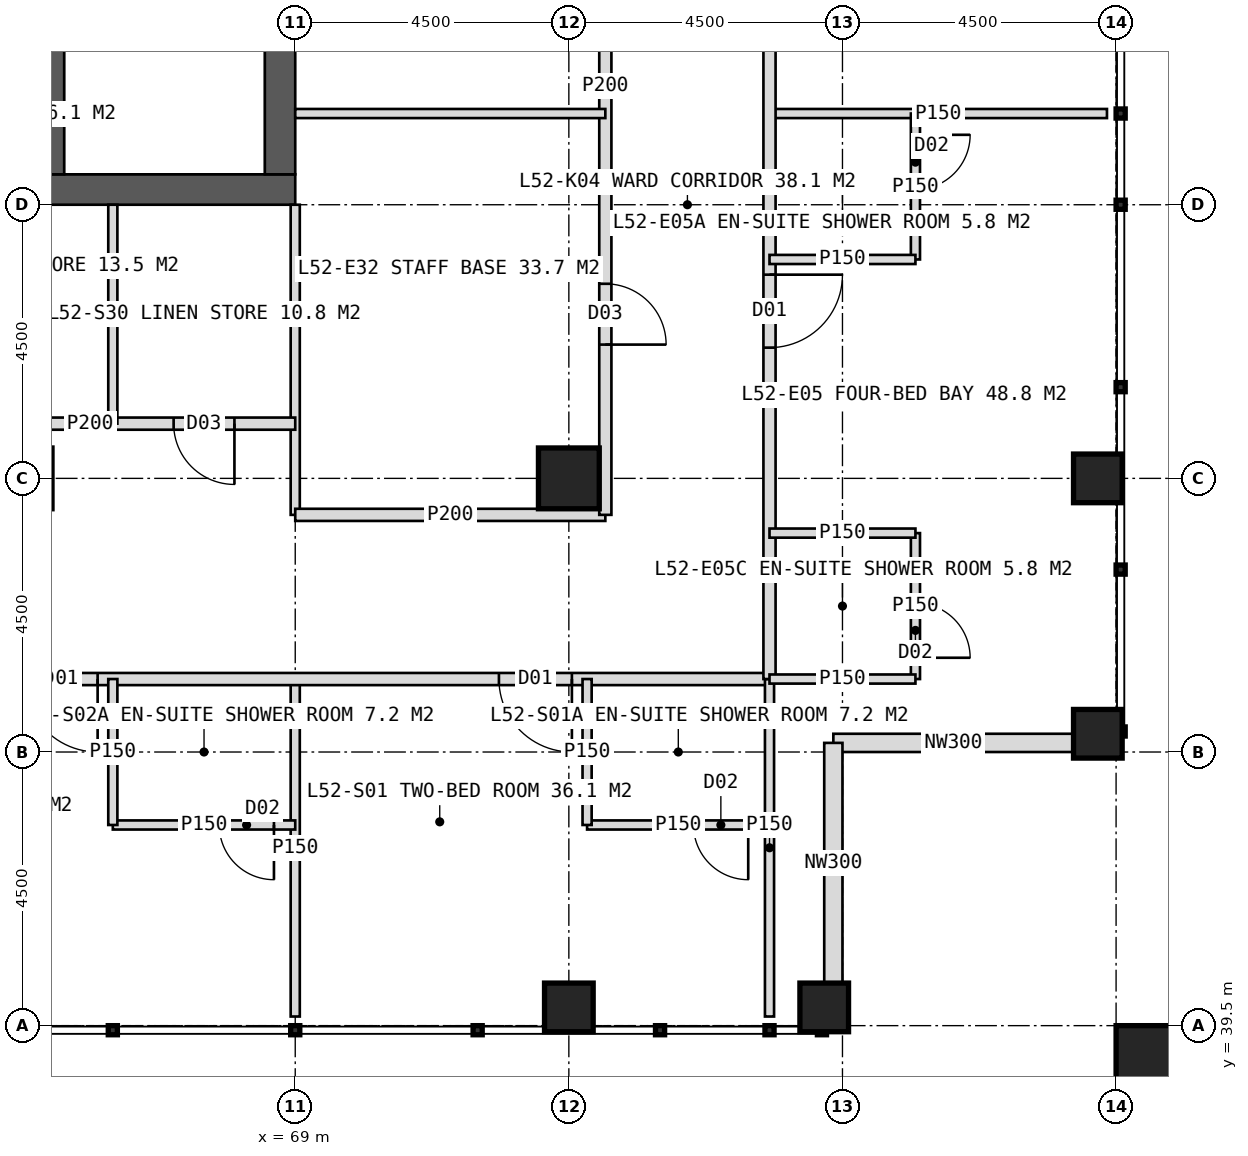
"""IFC4 building model, lengths in metres.
Left out: names, types, materials, properties, quantities, classifications, styles, units other than length and angle.
Written with IfcOpenShell. Run it as: python <this file> out.ifc"""

import sys

from ifc_helpers import new_model, si_unit, direction, frame, frame_2d, origin, origin_2d, place, context, subcontext, project, spatial, rectangle, hollow_rectangle, extrude, element, fill, save


model = new_model("IFC4")
c1 = context("Model", 3, precision=1e-05, world=origin(), true_north=direction((0.0, 1.0)))
c2 = subcontext(c1, "Body", "Model", "MODEL_VIEW")
j1 = project(units=[si_unit("LENGTHUNIT", "METRE"), si_unit("PLANEANGLEUNIT", "RADIAN")], contexts=[c1])
p1 = place(None, origin())
s1 = spatial("IfcSite", under=j1, at=p1, CompositionType="ELEMENT")
p2 = place(p1, origin())
s2 = spatial("IfcBuilding", under=s1, at=p2, CompositionType="ELEMENT")
p3 = place(p2, frame((0.0, 0.0, 217.0)))
s3 = spatial("IfcBuildingStorey", under=s2, at=p3, CompositionType="ELEMENT", Elevation=217.0)
p4 = place(p3, frame((51.0, 53.25, 0.0), z_axis=(0.0, 0.0, 1.0), x_axis=(1.0, 0.0, 0.0)))
e1 = element("IfcWall", 1, at=p4, inside=s3, PredefinedType="SHEAR", context=c2, shape_type="SweptSolid", body=[
    extrude(rectangle(XDim=18.0, YDim=0.5, at=frame_2d((9.0, 0.0))), origin(), (0.0, 0.0, 1.0), 4.0),
])
p5 = place(p4, frame((8.1, 0.0, 0.0)))
e2 = element("IfcOpeningElement", 2, at=p5, cuts=e1, PredefinedType="OPENING", context=c2, shape_type="SweptSolid", body=[
    extrude(rectangle(XDim=1.8, YDim=2.2, at=frame_2d((0.9, 1.1))), frame((0.0, 0.26, 0.0), z_axis=(0.0, -1.0, 0.0), x_axis=(1.0, 0.0, 0.0)), (0.0, 0.0, 1.0), 0.52),
])
p6 = place(p3, frame((68.75, 53.5, 0.0), z_axis=(0.0, 0.0, 1.0), x_axis=(0.0, 1.0, 0.0)))
e3 = element("IfcWall", 3, at=p6, inside=s3, PredefinedType="SHEAR", context=c2, shape_type="SweptSolid", body=[
    extrude(rectangle(XDim=17.0, YDim=0.5, at=frame_2d((8.5, 0.0))), origin(), (0.0, 0.0, 1.0), 4.0),
])
p7 = place(p6, frame((9.6, 0.0, 0.0)))
e4 = element("IfcOpeningElement", 4, at=p7, cuts=e3, PredefinedType="OPENING", context=c2, shape_type="SweptSolid", body=[
    extrude(rectangle(XDim=1.5, YDim=2.2, at=frame_2d((0.75, 1.1))), frame((0.0, 0.26, 0.0), z_axis=(0.0, -1.0, 0.0), x_axis=(1.0, 0.0, 0.0)), (0.0, 0.0, 1.0), 0.52),
])
p8 = place(p3, frame((65.05, 53.5, 0.0), z_axis=(0.0, 0.0, 1.0), x_axis=(0.0, 1.0, 0.0)))
e5 = element("IfcWall", 5, at=p8, inside=s3, PredefinedType="SHEAR", context=c2, shape_type="SweptSolid", body=[
    extrude(rectangle(XDim=17.0, YDim=0.3, at=frame_2d((8.5, 0.0))), origin(), (0.0, 0.0, 1.0), 4.0),
])
p9 = place(p3, frame((73.5, 48.5, 0.0), z_axis=(0.0, 0.0, 1.0), x_axis=(1.0, 0.0, 0.0)))
e6 = element("IfcColumn", 6, at=p9, inside=s3, PredefinedType="COLUMN", context=c2, shape_type="SweptSolid", body=[
    extrude(hollow_rectangle(XDim=1.0, YDim=1.0, WallThickness=0.1, at=origin_2d()), origin(), (0.0, 0.0, 1.0), 4.0),
])
for number, where, z_axis, x_axis in (
    (7, (82.2, 44.3, 0.0), (0.0, 0.0, 1.0), (1.0, 0.0, 0.0)),
    (8, (82.2, 48.5, 0.0), (0.0, 0.0, 1.0), (1.0, 0.0, 0.0)),
    (9, (73.5, 39.8, 0.0), (0.0, 0.0, 1.0), (1.0, 0.0, 0.0)),
    (10, (77.7, 39.8, 0.0), (0.0, 0.0, 1.0), (1.0, 0.0, 0.0)),
):
    element("IfcColumn", number, at=place(p3, frame(where, z_axis=z_axis, x_axis=x_axis)), inside=s3, PredefinedType="COLUMN", context=c2, shape_type="SweptSolid", body=[
        extrude(hollow_rectangle(XDim=0.8, YDim=0.8, WallThickness=0.08, at=origin_2d()), origin(), (0.0, 0.0, 1.0), 4.0),
    ])
p10 = place(p3, frame((83.1, 38.9, 0.0), z_axis=(0.0, 0.0, 1.0), x_axis=(1.0, 0.0, 0.0)))
e11 = element("IfcColumn", 11, at=p10, inside=s3, PredefinedType="COLUMN", context=c2, shape_type="SweptSolid", body=[
    extrude(hollow_rectangle(XDim=1.2, YDim=1.2, WallThickness=0.07, at=origin_2d()), origin(), (0.0, 0.0, 1.0), 4.0),
])
for number, where, z_axis, x_axis in (
    (12, (81.8, 44.15, 0.0), (0.0, 0.0, 1.0), (-1.0, 0.0, 0.0)),
    (13, (77.85, 44.15, 0.0), (0.0, 0.0, 1.0), (0.0, -1.0, 0.0)),
):
    element("IfcWall", number, at=place(p3, frame(where, z_axis=z_axis, x_axis=x_axis)), inside=s3, PredefinedType="ELEMENTEDWALL", context=c2, shape_type="SweptSolid", body=[
        extrude(rectangle(XDim=3.95, YDim=0.3, at=frame_2d((1.975, 0.0))), origin(), (0.0, 0.0, 1.0), 2.85),
    ])
p11 = place(p3, frame((69.0, 45.2, 0.0), z_axis=(0.0, 0.0, 1.0), x_axis=(0.0, -1.0, 0.0)))
e14 = element("IfcWall", 14, at=p11, inside=s3, PredefinedType="PARTITIONING", context=c2, shape_type="SweptSolid", body=[
    extrude(rectangle(XDim=5.55, YDim=0.15, at=frame_2d((2.775, 0.0))), origin(), (0.0, 0.0, 1.0), 3.75),
])
p12 = place(p3, frame((76.8, 45.2, 0.0), z_axis=(0.0, 0.0, 1.0), x_axis=(-1.0, 0.0, 0.0)))
e15 = element("IfcWall", 15, at=p12, inside=s3, PredefinedType="PARTITIONING", context=c2, shape_type="SweptSolid", body=[
    extrude(rectangle(XDim=33.6, YDim=0.2, at=frame_2d((16.8, 0.0))), origin(), (0.0, 0.0, 1.0), 3.75),
])
p13 = place(p12, frame((3.25, 0.0, 0.0)))
e16 = element("IfcOpeningElement", 16, at=p13, cuts=e15, PredefinedType="OPENING", context=c2, shape_type="SweptSolid", body=[
    extrude(rectangle(XDim=1.2, YDim=2.2, at=frame_2d((0.6, 1.1))), frame((0.0, 0.11, 0.0), z_axis=(0.0, -1.0, 0.0), x_axis=(1.0, 0.0, 0.0)), (0.0, 0.0, 1.0), 0.22),
])
p14 = place(p12, frame((11.05, 0.0, 0.0)))
e17 = element("IfcOpeningElement", 17, at=p14, cuts=e15, PredefinedType="OPENING", context=c2, shape_type="SweptSolid", body=[
    extrude(rectangle(XDim=1.2, YDim=2.2, at=frame_2d((0.6, 1.1))), frame((0.0, 0.11, 0.0), z_axis=(0.0, -1.0, 0.0), x_axis=(1.0, 0.0, 0.0)), (0.0, 0.0, 1.0), 0.22),
])
p15 = place(p12, frame((20.05, 0.0, 0.0)))
e18 = element("IfcOpeningElement", 18, at=p15, cuts=e15, PredefinedType="OPENING", context=c2, shape_type="SweptSolid", body=[
    extrude(rectangle(XDim=1.2, YDim=2.2, at=frame_2d((0.6, 1.1))), frame((0.0, 0.11, 0.0), z_axis=(0.0, -1.0, 0.0), x_axis=(1.0, 0.0, 0.0)), (0.0, 0.0, 1.0), 0.22),
])
p16 = place(p12, frame((29.05, 0.0, 0.0)))
e19 = element("IfcOpeningElement", 19, at=p16, cuts=e15, PredefinedType="OPENING", context=c2, shape_type="SweptSolid", body=[
    extrude(rectangle(XDim=1.2, YDim=2.2, at=frame_2d((0.6, 1.1))), frame((0.0, 0.11, 0.0), z_axis=(0.0, -1.0, 0.0), x_axis=(1.0, 0.0, 0.0)), (0.0, 0.0, 1.0), 0.22),
])
p17 = place(p3, frame((76.8, 45.2, 0.0), z_axis=(0.0, 0.0, 1.0), x_axis=(0.0, -1.0, 0.0)))
e20 = element("IfcWall", 20, at=p17, inside=s3, PredefinedType="PARTITIONING", context=c2, shape_type="SweptSolid", body=[
    extrude(rectangle(XDim=5.55, YDim=0.15, at=frame_2d((2.775, 0.0))), origin(), (0.0, 0.0, 1.0), 3.75),
])
p18 = place(p3, frame((76.8, 42.8, 0.0), z_axis=(0.0, 0.0, 1.0), x_axis=(-1.0, 0.0, 0.0)))
e21 = element("IfcWall", 21, at=p18, inside=s3, PredefinedType="PARTITIONING", context=c2, shape_type="SweptSolid", body=[
    extrude(rectangle(XDim=3.0, YDim=0.15, at=frame_2d((1.5, 0.0))), origin(), (0.0, 0.0, 1.0), 3.75),
])
p19 = place(p18, frame((0.35, 0.0, 0.0)))
e22 = element("IfcOpeningElement", 22, at=p19, cuts=e21, PredefinedType="OPENING", context=c2, shape_type="SweptSolid", body=[
    extrude(rectangle(XDim=0.9, YDim=2.1, at=frame_2d((0.45, 1.05))), frame((0.0, 0.085, 0.0), z_axis=(0.0, -1.0, 0.0), x_axis=(1.0, 0.0, 0.0)), (0.0, 0.0, 1.0), 0.17),
])
p20 = place(p3, frame((73.8, 45.2, 0.0), z_axis=(0.0, 0.0, 1.0), x_axis=(0.0, -1.0, 0.0)))
e23 = element("IfcWall", 23, at=p20, inside=s3, PredefinedType="PARTITIONING", context=c2, shape_type="SweptSolid", body=[
    extrude(rectangle(XDim=2.4, YDim=0.15, at=frame_2d((1.2, 0.0))), origin(), (0.0, 0.0, 1.0), 3.75),
])
p21 = place(p3, frame((69.0, 42.8, 0.0), z_axis=(0.0, 0.0, 1.0), x_axis=(-1.0, 0.0, 0.0)))
e24 = element("IfcWall", 24, at=p21, inside=s3, PredefinedType="PARTITIONING", context=c2, shape_type="SweptSolid", body=[
    extrude(rectangle(XDim=3.0, YDim=0.15, at=frame_2d((1.5, 0.0))), origin(), (0.0, 0.0, 1.0), 3.75),
])
p22 = place(p21, frame((0.35, 0.0, 0.0)))
e25 = element("IfcOpeningElement", 25, at=p22, cuts=e24, PredefinedType="OPENING", context=c2, shape_type="SweptSolid", body=[
    extrude(rectangle(XDim=0.9, YDim=2.1, at=frame_2d((0.45, 1.05))), frame((0.0, 0.085, 0.0), z_axis=(0.0, -1.0, 0.0), x_axis=(1.0, 0.0, 0.0)), (0.0, 0.0, 1.0), 0.17),
])
p23 = place(p3, frame((66.0, 45.2, 0.0), z_axis=(0.0, 0.0, 1.0), x_axis=(0.0, -1.0, 0.0)))
e26 = element("IfcWall", 26, at=p23, inside=s3, PredefinedType="PARTITIONING", context=c2, shape_type="SweptSolid", body=[
    extrude(rectangle(XDim=2.4, YDim=0.15, at=frame_2d((1.2, 0.0))), origin(), (0.0, 0.0, 1.0), 3.75),
])
p24 = place(p3, frame((69.0, 53.0, 0.0), z_axis=(0.0, 0.0, 1.0), x_axis=(0.0, -1.0, 0.0)))
e27 = element("IfcWall", 27, at=p24, inside=s3, PredefinedType="PARTITIONING", context=c2, shape_type="SweptSolid", body=[
    extrude(rectangle(XDim=5.1, YDim=0.15, at=frame_2d((2.55, 0.0))), origin(), (0.0, 0.0, 1.0), 3.75),
])
p25 = place(p3, frame((74.1, 47.9, 0.0), z_axis=(0.0, 0.0, 1.0), x_axis=(-1.0, 0.0, 0.0)))
e28 = element("IfcWall", 28, at=p25, inside=s3, PredefinedType="PARTITIONING", context=c2, shape_type="SweptSolid", body=[
    extrude(rectangle(XDim=5.1, YDim=0.2, at=frame_2d((2.55, 0.0))), origin(), (0.0, 0.0, 1.0), 3.75),
])
p26 = place(p3, frame((69.0, 49.4, 0.0), z_axis=(0.0, 0.0, 1.0), x_axis=(-1.0, 0.0, 0.0)))
e29 = element("IfcWall", 29, at=p26, inside=s3, PredefinedType="PARTITIONING", context=c2, shape_type="SweptSolid", body=[
    extrude(rectangle(XDim=6.75, YDim=0.2, at=frame_2d((3.375, 0.0))), origin(), (0.0, 0.0, 1.0), 3.75),
])
p27 = place(p26, frame((1.0, 0.0, 0.0)))
e30 = element("IfcOpeningElement", 30, at=p27, cuts=e29, PredefinedType="OPENING", context=c2, shape_type="SweptSolid", body=[
    extrude(rectangle(XDim=1.0, YDim=2.1, at=frame_2d((0.5, 1.05))), frame((0.0, 0.11, 0.0), z_axis=(0.0, -1.0, 0.0), x_axis=(1.0, 0.0, 0.0)), (0.0, 0.0, 1.0), 0.22),
])
p28 = place(p26, frame((5.425, 0.0, 0.0)))
e31 = element("IfcOpeningElement", 31, at=p28, cuts=e29, PredefinedType="OPENING", context=c2, shape_type="SweptSolid", body=[
    extrude(rectangle(XDim=1.0, YDim=2.1, at=frame_2d((0.5, 1.05))), frame((0.0, 0.11, 0.0), z_axis=(0.0, -1.0, 0.0), x_axis=(1.0, 0.0, 0.0)), (0.0, 0.0, 1.0), 0.22),
])
p29 = place(p3, frame((66.0, 53.0, 0.0), z_axis=(0.0, 0.0, 1.0), x_axis=(0.0, -1.0, 0.0)))
e32 = element("IfcWall", 32, at=p29, inside=s3, PredefinedType="PARTITIONING", context=c2, shape_type="SweptSolid", body=[
    extrude(rectangle(XDim=3.6, YDim=0.15, at=frame_2d((1.8, 0.0))), origin(), (0.0, 0.0, 1.0), 3.75),
])
p30 = place(p3, frame((76.8, 54.5, 0.0), z_axis=(0.0, 0.0, 1.0), x_axis=(1.0, 0.0, 0.0)))
e33 = element("IfcWall", 33, at=p30, inside=s3, PredefinedType="PARTITIONING", context=c2, shape_type="SweptSolid", body=[
    extrude(rectangle(XDim=5.55, YDim=0.15, at=frame_2d((2.775, 0.0))), origin(), (0.0, 0.0, 1.0), 3.75),
])
p31 = place(p3, frame((76.8, 78.8, 0.0), z_axis=(0.0, 0.0, 1.0), x_axis=(0.0, -1.0, 0.0)))
e34 = element("IfcWall", 34, at=p31, inside=s3, PredefinedType="PARTITIONING", context=c2, shape_type="SweptSolid", body=[
    extrude(rectangle(XDim=33.6, YDim=0.2, at=frame_2d((16.8, 0.0))), origin(), (0.0, 0.0, 1.0), 3.75),
])
p32 = place(p31, frame((3.25, 0.0, 0.0)))
e35 = element("IfcOpeningElement", 35, at=p32, cuts=e34, PredefinedType="OPENING", context=c2, shape_type="SweptSolid", body=[
    extrude(rectangle(XDim=1.2, YDim=2.2, at=frame_2d((0.6, 1.1))), frame((0.0, 0.11, 0.0), z_axis=(0.0, -1.0, 0.0), x_axis=(1.0, 0.0, 0.0)), (0.0, 0.0, 1.0), 0.22),
])
p33 = place(p31, frame((10.45, 0.0, 0.0)))
e36 = element("IfcOpeningElement", 36, at=p33, cuts=e34, PredefinedType="OPENING", context=c2, shape_type="SweptSolid", body=[
    extrude(rectangle(XDim=1.2, YDim=2.2, at=frame_2d((0.6, 1.1))), frame((0.0, 0.11, 0.0), z_axis=(0.0, -1.0, 0.0), x_axis=(1.0, 0.0, 0.0)), (0.0, 0.0, 1.0), 0.22),
])
p34 = place(p31, frame((14.8, 0.0, 0.0)))
e37 = element("IfcOpeningElement", 37, at=p34, cuts=e34, PredefinedType="OPENING", context=c2, shape_type="SweptSolid", body=[
    extrude(rectangle(XDim=1.0, YDim=2.1, at=frame_2d((0.5, 1.05))), frame((0.0, 0.11, 0.0), z_axis=(0.0, -1.0, 0.0), x_axis=(1.0, 0.0, 0.0)), (0.0, 0.0, 1.0), 0.22),
])
p35 = place(p31, frame((20.05, 0.0, 0.0)))
e38 = element("IfcOpeningElement", 38, at=p35, cuts=e34, PredefinedType="OPENING", context=c2, shape_type="SweptSolid", body=[
    extrude(rectangle(XDim=1.2, YDim=2.2, at=frame_2d((0.6, 1.1))), frame((0.0, 0.11, 0.0), z_axis=(0.0, -1.0, 0.0), x_axis=(1.0, 0.0, 0.0)), (0.0, 0.0, 1.0), 0.22),
])
p36 = place(p31, frame((26.95, 0.0, 0.0)))
e39 = element("IfcOpeningElement", 39, at=p36, cuts=e34, PredefinedType="OPENING", context=c2, shape_type="SweptSolid", body=[
    extrude(rectangle(XDim=1.2, YDim=2.2, at=frame_2d((0.6, 1.1))), frame((0.0, 0.11, 0.0), z_axis=(0.0, -1.0, 0.0), x_axis=(1.0, 0.0, 0.0)), (0.0, 0.0, 1.0), 0.22),
])
p37 = place(p3, frame((79.2, 54.5, 0.0), z_axis=(0.0, 0.0, 1.0), x_axis=(0.0, -1.0, 0.0)))
e40 = element("IfcWall", 40, at=p37, inside=s3, PredefinedType="PARTITIONING", context=c2, shape_type="SweptSolid", body=[
    extrude(rectangle(XDim=2.4, YDim=0.15, at=frame_2d((1.2, 0.0))), origin(), (0.0, 0.0, 1.0), 3.75),
])
p38 = place(p37, frame((0.35, 0.0, 0.0)))
e41 = element("IfcOpeningElement", 41, at=p38, cuts=e40, PredefinedType="OPENING", context=c2, shape_type="SweptSolid", body=[
    extrude(rectangle(XDim=0.9, YDim=2.1, at=frame_2d((0.45, 1.05))), frame((0.0, 0.085, 0.0), z_axis=(0.0, -1.0, 0.0), x_axis=(1.0, 0.0, 0.0)), (0.0, 0.0, 1.0), 0.17),
])
p39 = place(p3, frame((76.8, 52.1, 0.0), z_axis=(0.0, 0.0, 1.0), x_axis=(1.0, 0.0, 0.0)))
e42 = element("IfcWall", 42, at=p39, inside=s3, PredefinedType="PARTITIONING", context=c2, shape_type="SweptSolid", body=[
    extrude(rectangle(XDim=2.4, YDim=0.15, at=frame_2d((1.2, 0.0))), origin(), (0.0, 0.0, 1.0), 3.75),
])
p40 = place(p3, frame((79.2, 47.6, 0.0), z_axis=(0.0, 0.0, 1.0), x_axis=(0.0, -1.0, 0.0)))
e43 = element("IfcWall", 43, at=p40, inside=s3, PredefinedType="PARTITIONING", context=c2, shape_type="SweptSolid", body=[
    extrude(rectangle(XDim=2.4, YDim=0.15, at=frame_2d((1.2, 0.0))), origin(), (0.0, 0.0, 1.0), 3.75),
])
p41 = place(p40, frame((1.15, 0.0, 0.0)))
e44 = element("IfcOpeningElement", 44, at=p41, cuts=e43, PredefinedType="OPENING", context=c2, shape_type="SweptSolid", body=[
    extrude(rectangle(XDim=0.9, YDim=2.1, at=frame_2d((0.45, 1.05))), frame((0.0, 0.085, 0.0), z_axis=(0.0, -1.0, 0.0), x_axis=(1.0, 0.0, 0.0)), (0.0, 0.0, 1.0), 0.17),
])
for number, where, z_axis, x_axis in (
    (45, (76.8, 47.6, 0.0), (0.0, 0.0, 1.0), (1.0, 0.0, 0.0)),
    (46, (76.8, 45.2, 0.0), (0.0, 0.0, 1.0), (1.0, 0.0, 0.0)),
):
    element("IfcWall", number, at=place(p3, frame(where, z_axis=z_axis, x_axis=x_axis)), inside=s3, PredefinedType="PARTITIONING", context=c2, shape_type="SweptSolid", body=[
        extrude(rectangle(XDim=2.4, YDim=0.15, at=frame_2d((1.2, 0.0))), origin(), (0.0, 0.0, 1.0), 3.75),
    ])
p42 = place(p3, frame((74.1, 62.0, 0.0), z_axis=(0.0, 0.0, 1.0), x_axis=(0.0, -1.0, 0.0)))
e47 = element("IfcWall", 47, at=p42, inside=s3, PredefinedType="PARTITIONING", context=c2, shape_type="SweptSolid", body=[
    extrude(rectangle(XDim=14.1, YDim=0.2, at=frame_2d((7.05, 0.0))), origin(), (0.0, 0.0, 1.0), 3.75),
])
p43 = place(p42, frame((1.45, 0.0, 0.0)))
e48 = element("IfcOpeningElement", 48, at=p43, cuts=e47, PredefinedType="OPENING", context=c2, shape_type="SweptSolid", body=[
    extrude(rectangle(XDim=1.0, YDim=2.1, at=frame_2d((0.5, 1.05))), frame((0.0, 0.11, 0.0), z_axis=(0.0, -1.0, 0.0), x_axis=(1.0, 0.0, 0.0)), (0.0, 0.0, 1.0), 0.22),
])
p44 = place(p42, frame((10.3, 0.0, 0.0)))
e49 = element("IfcOpeningElement", 49, at=p44, cuts=e47, PredefinedType="OPENING", context=c2, shape_type="SweptSolid", body=[
    extrude(rectangle(XDim=1.0, YDim=2.1, at=frame_2d((0.5, 1.05))), frame((0.0, 0.11, 0.0), z_axis=(0.0, -1.0, 0.0), x_axis=(1.0, 0.0, 0.0)), (0.0, 0.0, 1.0), 0.22),
])
p45 = place(p3, frame((69.0, 54.5, 0.0), z_axis=(0.0, 0.0, 1.0), x_axis=(1.0, 0.0, 0.0)))
e50 = element("IfcWall", 50, at=p45, inside=s3, PredefinedType="PARTITIONING", context=c2, shape_type="SweptSolid", body=[
    extrude(rectangle(XDim=5.1, YDim=0.15, at=frame_2d((2.55, 0.0))), origin(), (0.0, 0.0, 1.0), 3.75),
])
p46 = place(p13, origin())
e51 = element("IfcDoor", 51, at=p46, inside=s3, OperationType="SINGLE_SWING_LEFT", PredefinedType="DOOR", context=c2, shape_type="SweptSolid", body=[
    extrude(rectangle(XDim=1.2, YDim=2.2, at=frame_2d((0.6, 1.1))), frame((0.0, 0.025, 0.0), z_axis=(0.0, -1.0, 0.0), x_axis=(1.0, 0.0, 0.0)), (0.0, 0.0, 1.0), 0.05),
])
fill(e16, e51)
p47 = place(p19, origin())
e52 = element("IfcDoor", 52, at=p47, inside=s3, OperationType="SINGLE_SWING_LEFT", PredefinedType="DOOR", context=c2, shape_type="SweptSolid", body=[
    extrude(rectangle(XDim=0.9, YDim=2.1, at=frame_2d((0.45, 1.05))), frame((0.0, 0.025, 0.0), z_axis=(0.0, -1.0, 0.0), x_axis=(1.0, 0.0, 0.0)), (0.0, 0.0, 1.0), 0.05),
])
fill(e22, e52)
p48 = place(p14, origin())
e53 = element("IfcDoor", 53, at=p48, inside=s3, OperationType="SINGLE_SWING_LEFT", PredefinedType="DOOR", context=c2, shape_type="SweptSolid", body=[
    extrude(rectangle(XDim=1.2, YDim=2.2, at=frame_2d((0.6, 1.1))), frame((0.0, 0.025, 0.0), z_axis=(0.0, -1.0, 0.0), x_axis=(1.0, 0.0, 0.0)), (0.0, 0.0, 1.0), 0.05),
])
fill(e17, e53)
p49 = place(p22, origin())
e54 = element("IfcDoor", 54, at=p49, inside=s3, OperationType="SINGLE_SWING_LEFT", PredefinedType="DOOR", context=c2, shape_type="SweptSolid", body=[
    extrude(rectangle(XDim=0.9, YDim=2.1, at=frame_2d((0.45, 1.05))), frame((0.0, 0.025, 0.0), z_axis=(0.0, -1.0, 0.0), x_axis=(1.0, 0.0, 0.0)), (0.0, 0.0, 1.0), 0.05),
])
fill(e25, e54)
p50 = place(p27, origin())
e55 = element("IfcDoor", 55, at=p50, inside=s3, OperationType="SINGLE_SWING_LEFT", PredefinedType="DOOR", context=c2, shape_type="SweptSolid", body=[
    extrude(rectangle(XDim=1.0, YDim=2.1, at=frame_2d((0.5, 1.05))), frame((0.0, 0.025, 0.0), z_axis=(0.0, -1.0, 0.0), x_axis=(1.0, 0.0, 0.0)), (0.0, 0.0, 1.0), 0.05),
])
fill(e30, e55)
p51 = place(p36, origin())
e56 = element("IfcDoor", 56, at=p51, inside=s3, OperationType="SINGLE_SWING_LEFT", PredefinedType="DOOR", context=c2, shape_type="SweptSolid", body=[
    extrude(rectangle(XDim=1.2, YDim=2.2, at=frame_2d((0.6, 1.1))), frame((0.0, 0.025, 0.0), z_axis=(0.0, -1.0, 0.0), x_axis=(1.0, 0.0, 0.0)), (0.0, 0.0, 1.0), 0.05),
])
fill(e39, e56)
p52 = place(p38, origin())
e57 = element("IfcDoor", 57, at=p52, inside=s3, OperationType="SINGLE_SWING_LEFT", PredefinedType="DOOR", context=c2, shape_type="SweptSolid", body=[
    extrude(rectangle(XDim=0.9, YDim=2.1, at=frame_2d((0.45, 1.05))), frame((0.0, 0.025, 0.0), z_axis=(0.0, -1.0, 0.0), x_axis=(1.0, 0.0, 0.0)), (0.0, 0.0, 1.0), 0.05),
])
fill(e41, e57)
p53 = place(p41, origin())
e58 = element("IfcDoor", 58, at=p53, inside=s3, OperationType="SINGLE_SWING_RIGHT", PredefinedType="DOOR", context=c2, shape_type="SweptSolid", body=[
    extrude(rectangle(XDim=0.9, YDim=2.1, at=frame_2d((0.45, 1.05))), frame((0.0, 0.025, 0.0), z_axis=(0.0, -1.0, 0.0), x_axis=(1.0, 0.0, 0.0)), (0.0, 0.0, 1.0), 0.05),
])
fill(e44, e58)
p54 = place(p44, origin())
e59 = element("IfcDoor", 59, at=p54, inside=s3, OperationType="SINGLE_SWING_RIGHT", PredefinedType="DOOR", context=c2, shape_type="SweptSolid", body=[
    extrude(rectangle(XDim=1.0, YDim=2.1, at=frame_2d((0.5, 1.05))), frame((0.0, 0.025, 0.0), z_axis=(0.0, -1.0, 0.0), x_axis=(1.0, 0.0, 0.0)), (0.0, 0.0, 1.0), 0.05),
])
fill(e49, e59)
save(model, sys.argv[1])
